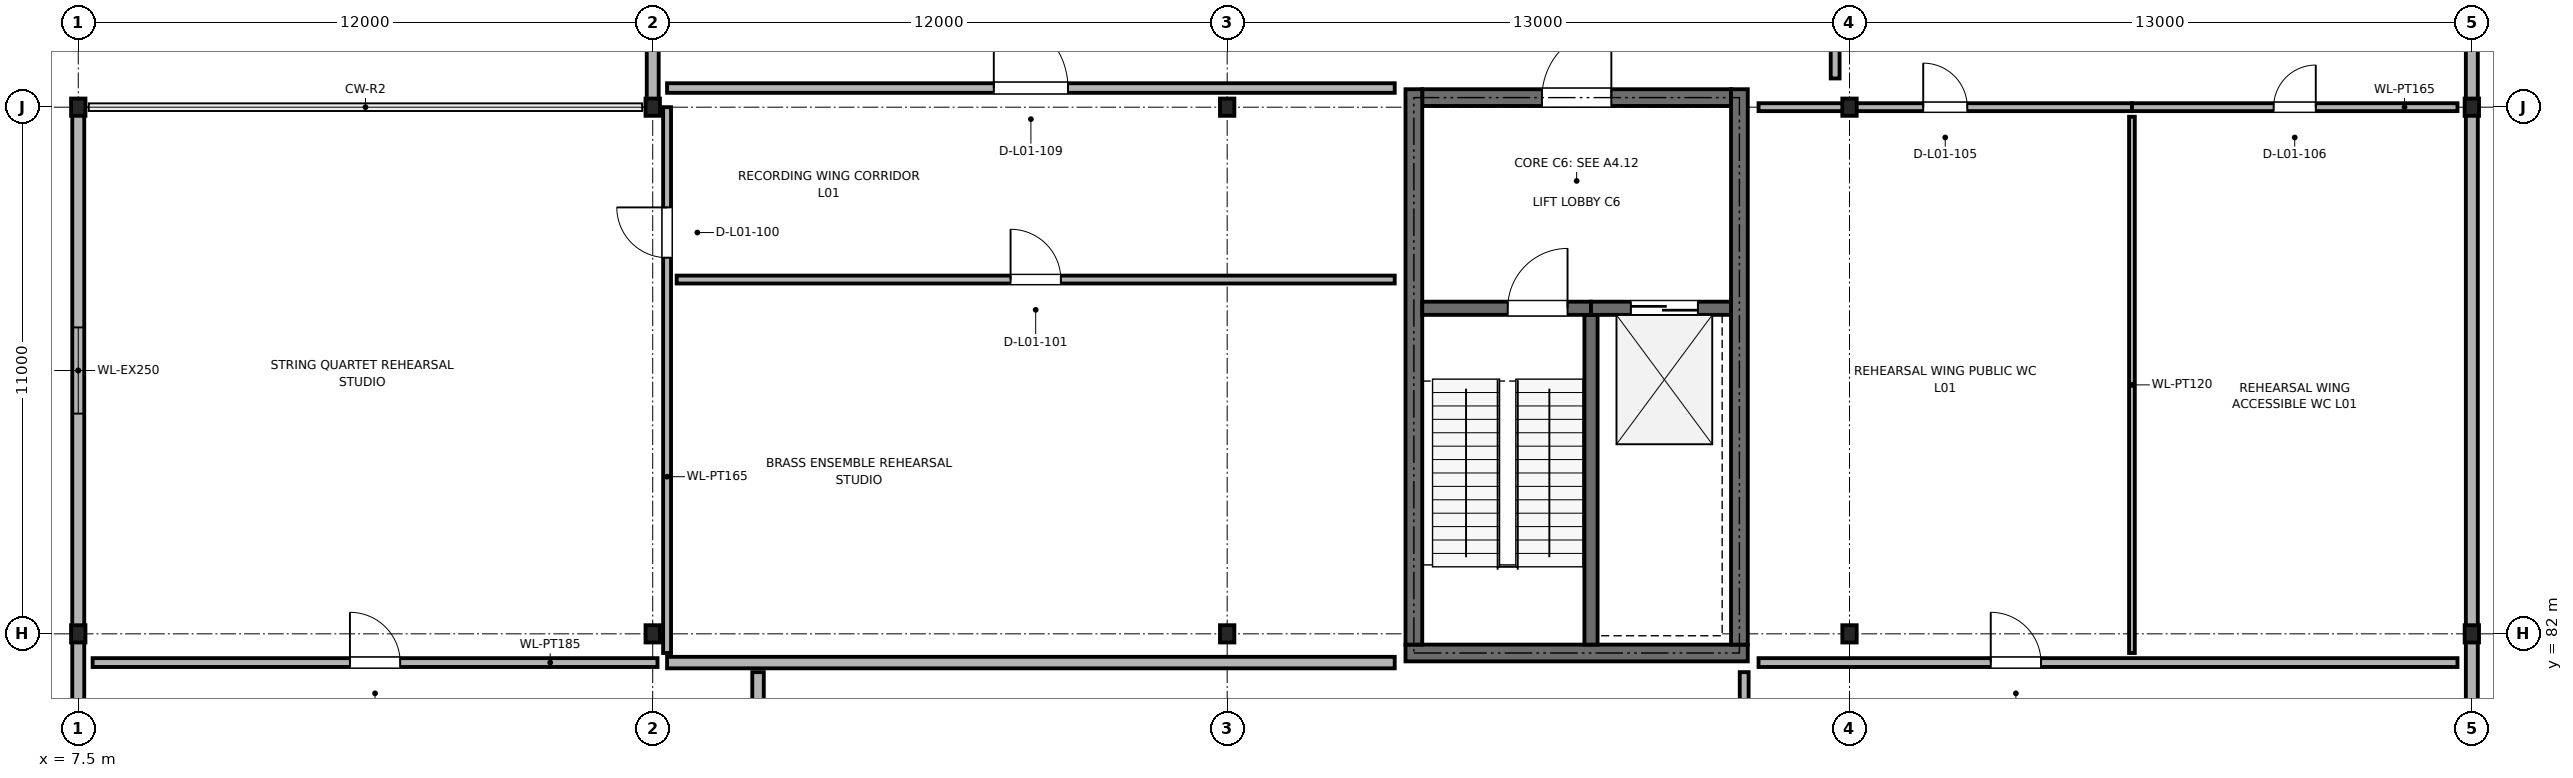
"""IFC4 building model, lengths in metres.
Left out: names, types, materials, properties, quantities, classifications, styles, units other than length and angle.
Written with IfcOpenShell. Run it as: python <this file> out.ifc"""

import sys

from ifc_helpers import new_model, si_unit, direction, frame, frame_2d, origin, origin_2d, place, context, subcontext, project, spatial, rectangle, i_section, extrude, element, fill, save


model = new_model("IFC4")
c1 = context("Model", 3, precision=1e-05, world=origin(), true_north=direction((0.0, 1.0)))
c2 = subcontext(c1, "Body", "Model", "MODEL_VIEW")
j1 = project(units=[si_unit("LENGTHUNIT", "METRE"), si_unit("PLANEANGLEUNIT", "RADIAN")], contexts=[c1])
p1 = place(None, origin())
s1 = spatial("IfcSite", under=j1, at=p1, CompositionType="ELEMENT")
p2 = place(p1, origin())
s2 = spatial("IfcBuilding", under=s1, at=p2, CompositionType="ELEMENT")
p3 = place(p2, frame((0.0, 0.0, 4.8)))
s3 = spatial("IfcBuildingStorey", under=s2, at=p3, CompositionType="ELEMENT", Elevation=4.8)
for number, where, z_axis, x_axis in (
    (1, (7.5, 82.0, 0.0), (0.0, 0.0, 1.0), (1.0, 0.0, 0.0)),
    (2, (7.5, 93.0, 0.0), (0.0, 0.0, 1.0), (1.0, 0.0, 0.0)),
    (3, (19.5, 82.0, 0.0), (0.0, 0.0, 1.0), (1.0, 0.0, 0.0)),
    (4, (19.5, 93.0, 0.0), (0.0, 0.0, 1.0), (1.0, 0.0, 0.0)),
    (5, (31.5, 82.0, 0.0), (0.0, 0.0, 1.0), (1.0, 0.0, 0.0)),
    (6, (31.5, 93.0, 0.0), (0.0, 0.0, 1.0), (1.0, 0.0, 0.0)),
    (7, (44.5, 82.0, 0.0), (0.0, 0.0, 1.0), (1.0, 0.0, 0.0)),
    (8, (44.5, 93.0, 0.0), (0.0, 0.0, 1.0), (1.0, 0.0, 0.0)),
    (9, (57.5, 82.0, 0.0), (0.0, 0.0, 1.0), (1.0, 0.0, 0.0)),
    (10, (57.5, 93.0, 0.0), (0.0, 0.0, 1.0), (1.0, 0.0, 0.0)),
):
    element("IfcColumn", number, at=place(p3, frame(where, z_axis=z_axis, x_axis=x_axis)), inside=s3, PredefinedType="COLUMN", context=c2, shape_type="SweptSolid", body=[
        extrude(i_section(OverallWidth=0.3, OverallDepth=0.36, WebThickness=0.012, FlangeThickness=0.022, FilletRadius=0.027, at=origin_2d()), origin(), (0.0, 0.0, 1.0), 4.8),
    ])
p4 = place(p3, frame((57.5, 81.98, 0.0), z_axis=(0.0, 0.0, 1.0), x_axis=(0.0, -1.0, 0.0)))
e11 = element("IfcWall", 11, at=p4, inside=s3, PredefinedType="SOLIDWALL", context=c2, shape_type="SweptSolid", body=[
    extrude(rectangle(XDim=10.96, YDim=0.25, at=frame_2d((5.48, 0.0))), origin(), (0.0, 0.0, 1.0), 4.078),
])
p5 = place(p4, frame((4.68, 0.0, 0.85)))
e12 = element("IfcOpeningElement", 12, at=p5, cuts=e11, PredefinedType="OPENING", context=c2, shape_type="SweptSolid", body=[
    extrude(rectangle(XDim=1.6, YDim=1.7, at=frame_2d((0.8, 0.85))), frame((0.0, 0.135, 0.0), z_axis=(0.0, -1.0, 0.0), x_axis=(1.0, 0.0, 0.0)), (0.0, 0.0, 1.0), 0.27),
])
p6 = place(p3, frame((57.5, 92.98, 0.0), z_axis=(0.0, 0.0, 1.0), x_axis=(0.0, -1.0, 0.0)))
e13 = element("IfcWall", 13, at=p6, inside=s3, PredefinedType="SOLIDWALL", context=c2, shape_type="SweptSolid", body=[
    extrude(rectangle(XDim=10.96, YDim=0.25, at=frame_2d((5.48, 0.0))), origin(), (0.0, 0.0, 1.0), 4.078),
])
p7 = place(p3, frame((57.5, 103.98, 0.0), z_axis=(0.0, 0.0, 1.0), x_axis=(0.0, -1.0, 0.0)))
e14 = element("IfcWall", 14, at=p7, inside=s3, PredefinedType="SOLIDWALL", context=c2, shape_type="SweptSolid", body=[
    extrude(rectangle(XDim=10.96, YDim=0.25, at=frame_2d((5.48, 0.0))), origin(), (0.0, 0.0, 1.0), 4.078),
])
p8 = place(p7, frame((4.58, 0.0, 0.85)))
e15 = element("IfcOpeningElement", 15, at=p8, cuts=e14, PredefinedType="OPENING", context=c2, shape_type="SweptSolid", body=[
    extrude(rectangle(XDim=1.8, YDim=1.7, at=frame_2d((0.9, 0.85))), frame((0.0, 0.135, 0.0), z_axis=(0.0, -1.0, 0.0), x_axis=(1.0, 0.0, 0.0)), (0.0, 0.0, 1.0), 0.27),
])
p9 = place(p3, frame((19.5, 93.02, 0.0), z_axis=(0.0, 0.0, 1.0), x_axis=(0.0, 1.0, 0.0)))
e16 = element("IfcWall", 16, at=p9, inside=s3, PredefinedType="SOLIDWALL", context=c2, shape_type="SweptSolid", body=[
    extrude(rectangle(XDim=10.96, YDim=0.25, at=frame_2d((5.48, 0.0))), origin(), (0.0, 0.0, 1.0), 4.078),
])
p10 = place(p9, frame((4.73, 0.0, 1.05)))
e17 = element("IfcOpeningElement", 17, at=p10, cuts=e16, PredefinedType="OPENING", context=c2, shape_type="SweptSolid", body=[
    extrude(rectangle(XDim=1.5, YDim=1.35, at=frame_2d((0.75, 0.675))), frame((0.0, 0.135, 0.0), z_axis=(0.0, -1.0, 0.0), x_axis=(1.0, 0.0, 0.0)), (0.0, 0.0, 1.0), 0.27),
])
p11 = place(p3, frame((7.5, 82.02, 0.0), z_axis=(0.0, 0.0, 1.0), x_axis=(0.0, 1.0, 0.0)))
e18 = element("IfcWall", 18, at=p11, inside=s3, PredefinedType="SOLIDWALL", context=c2, shape_type="SweptSolid", body=[
    extrude(rectangle(XDim=10.96, YDim=0.25, at=frame_2d((5.48, 0.0))), origin(), (0.0, 0.0, 1.0), 4.078),
])
p12 = place(p11, frame((4.58, 0.0, 1.05)))
e19 = element("IfcOpeningElement", 19, at=p12, cuts=e18, PredefinedType="OPENING", context=c2, shape_type="SweptSolid", body=[
    extrude(rectangle(XDim=1.8, YDim=1.35, at=frame_2d((0.9, 0.675))), frame((0.0, 0.135, 0.0), z_axis=(0.0, -1.0, 0.0), x_axis=(1.0, 0.0, 0.0)), (0.0, 0.0, 1.0), 0.27),
])
p13 = place(p3, frame((7.5, 71.02, 0.0), z_axis=(0.0, 0.0, 1.0), x_axis=(0.0, 1.0, 0.0)))
e20 = element("IfcWall", 20, at=p13, inside=s3, PredefinedType="SOLIDWALL", context=c2, shape_type="SweptSolid", body=[
    extrude(rectangle(XDim=10.96, YDim=0.25, at=frame_2d((5.48, 0.0))), origin(), (0.0, 0.0, 1.0), 4.078),
])
p14 = place(p13, frame((4.43, 0.0, 1.05)))
e21 = element("IfcOpeningElement", 21, at=p14, cuts=e20, PredefinedType="OPENING", context=c2, shape_type="SweptSolid", body=[
    extrude(rectangle(XDim=2.1, YDim=1.35, at=frame_2d((1.05, 0.675))), frame((0.0, 0.135, 0.0), z_axis=(0.0, -1.0, 0.0), x_axis=(1.0, 0.0, 0.0)), (0.0, 0.0, 1.0), 0.27),
])
p15 = place(p3, frame((35.225, 81.6, 0.0), z_axis=(0.0, 0.0, 1.0), x_axis=(1.0, 0.0, 0.0)))
e22 = element("IfcWall", 22, at=p15, inside=s3, PredefinedType="SHEAR", context=c2, shape_type="SweptSolid", body=[
    extrude(rectangle(XDim=7.15, YDim=0.35, at=frame_2d((3.575, 0.0))), origin(), (0.0, 0.0, 1.0), 4.54),
])
p16 = place(p3, frame((35.575, 93.2, 0.0), z_axis=(0.0, 0.0, 1.0), x_axis=(1.0, 0.0, 0.0)))
e23 = element("IfcWall", 23, at=p16, inside=s3, PredefinedType="SHEAR", context=c2, shape_type="SweptSolid", body=[
    extrude(rectangle(XDim=6.45, YDim=0.35, at=frame_2d((3.225, 0.0))), origin(), (0.0, 0.0, 1.0), 4.54),
])
p17 = place(p16, frame((2.5, 0.0, 0.0)))
e24 = element("IfcOpeningElement", 24, at=p17, cuts=e23, PredefinedType="OPENING", context=c2, shape_type="SweptSolid", body=[
    extrude(rectangle(XDim=1.45, YDim=2.2, at=frame_2d((0.725, 1.1))), frame((0.0, 0.185, 0.0), z_axis=(0.0, -1.0, 0.0), x_axis=(1.0, 0.0, 0.0)), (0.0, 0.0, 1.0), 0.37),
])
for number, where, z_axis, x_axis in (
    (25, (35.4, 81.775, 0.0), (0.0, 0.0, 1.0), (0.0, 1.0, 0.0)),
    (26, (42.2, 81.775, 0.0), (0.0, 0.0, 1.0), (0.0, 1.0, 0.0)),
):
    element("IfcWall", number, at=place(p3, frame(where, z_axis=z_axis, x_axis=x_axis)), inside=s3, PredefinedType="SHEAR", context=c2, shape_type="SweptSolid", body=[
        extrude(rectangle(XDim=11.6, YDim=0.35, at=frame_2d((5.8, 0.0))), origin(), (0.0, 0.0, 1.0), 4.54),
    ])
p18 = place(p3, frame((39.1, 81.775, 0.0), z_axis=(0.0, 0.0, 1.0), x_axis=(0.0, 1.0, 0.0)))
e27 = element("IfcWall", 27, at=p18, inside=s3, PredefinedType="SHEAR", context=c2, shape_type="SweptSolid", body=[
    extrude(rectangle(XDim=6.888, YDim=0.275, at=frame_2d((3.444, 0.0))), origin(), (0.0, 0.0, 1.0), 4.54),
])
p19 = place(p3, frame((35.575, 88.8, 0.0), z_axis=(0.0, 0.0, 1.0), x_axis=(1.0, 0.0, 0.0)))
e28 = element("IfcWall", 28, at=p19, inside=s3, PredefinedType="SHEAR", context=c2, shape_type="SweptSolid", body=[
    extrude(rectangle(XDim=3.525, YDim=0.275, at=frame_2d((1.763, 0.0))), origin(), (0.0, 0.0, 1.0), 4.54),
])
p20 = place(p19, frame((1.785, 0.0, 0.0)))
e29 = element("IfcOpeningElement", 29, at=p20, cuts=e28, PredefinedType="OPENING", context=c2, shape_type="SweptSolid", body=[
    extrude(rectangle(XDim=1.25, YDim=2.15, at=frame_2d((0.625, 1.075))), frame((0.0, 0.147, 0.0), z_axis=(0.0, -1.0, 0.0), x_axis=(1.0, 0.0, 0.0)), (0.0, 0.0, 1.0), 0.295),
])
p21 = place(p3, frame((39.1, 88.8, 0.0), z_axis=(0.0, 0.0, 1.0), x_axis=(1.0, 0.0, 0.0)))
e30 = element("IfcWall", 30, at=p21, inside=s3, PredefinedType="SHEAR", context=c2, shape_type="SweptSolid", body=[
    extrude(rectangle(XDim=2.925, YDim=0.275, at=frame_2d((1.462, 0.0))), origin(), (0.0, 0.0, 1.0), 4.54),
])
p22 = place(p21, frame((0.833, 0.0, 0.0)))
e31 = element("IfcOpeningElement", 31, at=p22, cuts=e30, PredefinedType="OPENING", context=c2, shape_type="SweptSolid", body=[
    extrude(rectangle(XDim=1.4, YDim=2.2, at=frame_2d((0.7, 1.1))), frame((0.0, 0.147, 0.0), z_axis=(0.0, -1.0, 0.0), x_axis=(1.0, 0.0, 0.0)), (0.0, 0.0, 1.0), 0.295),
])
p23 = place(p3, frame((19.8, 81.4, 0.0), z_axis=(0.0, 0.0, 1.0), x_axis=(1.0, 0.0, 0.0)))
e32 = element("IfcWall", 32, at=p23, inside=s3, PredefinedType="PARTITIONING", context=c2, shape_type="SweptSolid", body=[
    extrude(rectangle(XDim=15.2, YDim=0.24, at=frame_2d((7.6, 0.0))), origin(), (0.0, 0.0, 1.0), 3.88),
])
p24 = place(p3, frame((7.8, 81.4, 0.0), z_axis=(0.0, 0.0, 1.0), x_axis=(1.0, 0.0, 0.0)))
e33 = element("IfcWall", 33, at=p24, inside=s3, PredefinedType="PARTITIONING", context=c2, shape_type="SweptSolid", body=[
    extrude(rectangle(XDim=11.8, YDim=0.185, at=frame_2d((5.9, 0.0))), origin(), (0.0, 0.0, 1.0), 4.08),
])
p25 = place(p24, frame((5.375, 0.0, 0.0)))
e34 = element("IfcOpeningElement", 34, at=p25, cuts=e33, PredefinedType="OPENING", context=c2, shape_type="SweptSolid", body=[
    extrude(rectangle(XDim=1.05, YDim=2.15, at=frame_2d((0.525, 1.075))), frame((0.0, 0.103, 0.0), z_axis=(0.0, -1.0, 0.0), x_axis=(1.0, 0.0, 0.0)), (0.0, 0.0, 1.0), 0.205),
])
p26 = place(p3, frame((19.8, 81.6, 0.0), z_axis=(0.0, 0.0, 1.0), x_axis=(0.0, 1.0, 0.0)))
e35 = element("IfcWall", 35, at=p26, inside=s3, PredefinedType="PARTITIONING", context=c2, shape_type="SweptSolid", body=[
    extrude(rectangle(XDim=11.4, YDim=0.165, at=frame_2d((5.7, 0.0))), origin(), (0.0, 0.0, 1.0), 4.08),
])
p27 = place(p26, frame((8.257, 0.0, 0.0)))
e36 = element("IfcOpeningElement", 36, at=p27, cuts=e35, PredefinedType="OPENING", context=c2, shape_type="SweptSolid", body=[
    extrude(rectangle(XDim=1.05, YDim=2.15, at=frame_2d((0.525, 1.075))), frame((0.0, 0.093, 0.0), z_axis=(0.0, -1.0, 0.0), x_axis=(1.0, 0.0, 0.0)), (0.0, 0.0, 1.0), 0.185),
])
p28 = place(p3, frame((20.0, 89.4, 0.0), z_axis=(0.0, 0.0, 1.0), x_axis=(1.0, 0.0, 0.0)))
e37 = element("IfcWall", 37, at=p28, inside=s3, PredefinedType="PARTITIONING", context=c2, shape_type="SweptSolid", body=[
    extrude(rectangle(XDim=15.0, YDim=0.165, at=frame_2d((7.5, 0.0))), origin(), (0.0, 0.0, 1.0), 4.08),
])
p29 = place(p28, frame((6.975, 0.0, 0.0)))
e38 = element("IfcOpeningElement", 38, at=p29, cuts=e37, PredefinedType="OPENING", context=c2, shape_type="SweptSolid", body=[
    extrude(rectangle(XDim=1.05, YDim=2.15, at=frame_2d((0.525, 1.075))), frame((0.0, 0.093, 0.0), z_axis=(0.0, -1.0, 0.0), x_axis=(1.0, 0.0, 0.0)), (0.0, 0.0, 1.0), 0.185),
])
p30 = place(p3, frame((21.7, 60.3, 0.0), z_axis=(0.0, 0.0, 1.0), x_axis=(0.0, 1.0, 0.0)))
e39 = element("IfcWall", 39, at=p30, inside=s3, PredefinedType="PARTITIONING", context=c2, shape_type="SweptSolid", body=[
    extrude(rectangle(XDim=20.9, YDim=0.24, at=frame_2d((10.45, 0.0))), origin(), (0.0, 0.0, 1.0), 3.73),
])
p31 = place(p3, frame((42.3, 70.7, 0.0), z_axis=(0.0, 0.0, 1.0), x_axis=(0.0, 1.0, 0.0)))
e40 = element("IfcWall", 40, at=p31, inside=s3, PredefinedType="PARTITIONING", context=c2, shape_type="SweptSolid", body=[
    extrude(rectangle(XDim=10.5, YDim=0.185, at=frame_2d((5.25, 0.0))), origin(), (0.0, 0.0, 1.0), 3.73),
])
p32 = place(p3, frame((42.6, 93.0, 0.0), z_axis=(0.0, 0.0, 1.0), x_axis=(1.0, 0.0, 0.0)))
e41 = element("IfcWall", 41, at=p32, inside=s3, PredefinedType="PARTITIONING", context=c2, shape_type="SweptSolid", body=[
    extrude(rectangle(XDim=7.8, YDim=0.165, at=frame_2d((3.9, 0.0))), origin(), (0.0, 0.0, 1.0), 4.08),
])
p33 = place(p32, frame((3.44, 0.0, 0.0)))
e42 = element("IfcOpeningElement", 42, at=p33, cuts=e41, PredefinedType="OPENING", context=c2, shape_type="SweptSolid", body=[
    extrude(rectangle(XDim=0.92, YDim=2.1, at=frame_2d((0.46, 1.05))), frame((0.0, 0.093, 0.0), z_axis=(0.0, -1.0, 0.0), x_axis=(1.0, 0.0, 0.0)), (0.0, 0.0, 1.0), 0.185),
])
p34 = place(p3, frame((50.4, 93.0, 0.0), z_axis=(0.0, 0.0, 1.0), x_axis=(1.0, 0.0, 0.0)))
e43 = element("IfcWall", 43, at=p34, inside=s3, PredefinedType="PARTITIONING", context=c2, shape_type="SweptSolid", body=[
    extrude(rectangle(XDim=6.8, YDim=0.165, at=frame_2d((3.4, 0.0))), origin(), (0.0, 0.0, 1.0), 4.08),
])
p35 = place(p34, frame((2.96, 0.0, 0.0)))
e44 = element("IfcOpeningElement", 44, at=p35, cuts=e43, PredefinedType="OPENING", context=c2, shape_type="SweptSolid", body=[
    extrude(rectangle(XDim=0.88, YDim=2.1, at=frame_2d((0.44, 1.05))), frame((0.0, 0.093, 0.0), z_axis=(0.0, -1.0, 0.0), x_axis=(1.0, 0.0, 0.0)), (0.0, 0.0, 1.0), 0.185),
])
p36 = place(p3, frame((50.4, 81.6, 0.0), z_axis=(0.0, 0.0, 1.0), x_axis=(0.0, 1.0, 0.0)))
e45 = element("IfcWall", 45, at=p36, inside=s3, PredefinedType="PARTITIONING", context=c2, shape_type="SweptSolid", body=[
    extrude(rectangle(XDim=11.2, YDim=0.12, at=frame_2d((5.6, 0.0))), origin(), (0.0, 0.0, 1.0), 4.08),
])
p37 = place(p3, frame((42.6, 81.4, 0.0), z_axis=(0.0, 0.0, 1.0), x_axis=(1.0, 0.0, 0.0)))
e46 = element("IfcWall", 46, at=p37, inside=s3, PredefinedType="PARTITIONING", context=c2, shape_type="SweptSolid", body=[
    extrude(rectangle(XDim=14.6, YDim=0.185, at=frame_2d((7.3, 0.0))), origin(), (0.0, 0.0, 1.0), 4.08),
])
p38 = place(p37, frame((4.851, 0.0, 0.0)))
e47 = element("IfcOpeningElement", 47, at=p38, cuts=e46, PredefinedType="OPENING", context=c2, shape_type="SweptSolid", body=[
    extrude(rectangle(XDim=1.05, YDim=2.15, at=frame_2d((0.525, 1.075))), frame((0.0, 0.103, 0.0), z_axis=(0.0, -1.0, 0.0), x_axis=(1.0, 0.0, 0.0)), (0.0, 0.0, 1.0), 0.205),
])
p39 = place(p3, frame((44.2, 93.6, 0.0), z_axis=(0.0, 0.0, 1.0), x_axis=(0.0, 1.0, 0.0)))
e48 = element("IfcWall", 48, at=p39, inside=s3, PredefinedType="PARTITIONING", context=c2, shape_type="SweptSolid", body=[
    extrude(rectangle(XDim=21.3, YDim=0.185, at=frame_2d((10.65, 0.0))), origin(), (0.0, 0.0, 1.0), 4.08),
])
p40 = place(p39, frame((5.23, 0.0, 0.0)))
e49 = element("IfcOpeningElement", 49, at=p40, cuts=e48, PredefinedType="OPENING", context=c2, shape_type="SweptSolid", body=[
    extrude(rectangle(XDim=1.1, YDim=2.15, at=frame_2d((0.55, 1.075))), frame((0.0, 0.103, 0.0), z_axis=(0.0, -1.0, 0.0), x_axis=(1.0, 0.0, 0.0)), (0.0, 0.0, 1.0), 0.205),
])
p41 = place(p3, frame((19.8, 93.4, 0.0), z_axis=(0.0, 0.0, 1.0), x_axis=(1.0, 0.0, 0.0)))
e50 = element("IfcWall", 50, at=p41, inside=s3, PredefinedType="PARTITIONING", context=c2, shape_type="SweptSolid", body=[
    extrude(rectangle(XDim=15.2, YDim=0.2, at=frame_2d((7.6, 0.0))), origin(), (0.0, 0.0, 1.0), 4.08),
])
p42 = place(p41, frame((6.825, 0.0, 0.0)))
e51 = element("IfcOpeningElement", 51, at=p42, cuts=e50, PredefinedType="OPENING", context=c2, shape_type="SweptSolid", body=[
    extrude(rectangle(XDim=1.55, YDim=2.18, at=frame_2d((0.775, 1.09))), frame((0.0, 0.11, 0.0), z_axis=(0.0, -1.0, 0.0), x_axis=(1.0, 0.0, 0.0)), (0.0, 0.0, 1.0), 0.22),
])
p43 = place(p12, origin())
e52 = element("IfcWindow", 52, at=p43, inside=s3, PartitioningType="SINGLE_PANEL", PredefinedType="WINDOW", context=c2, shape_type="SweptSolid", body=[
    extrude(rectangle(XDim=1.8, YDim=1.35, at=frame_2d((0.9, 0.675))), frame((0.0, 0.03, 0.0), z_axis=(0.0, -1.0, 0.0), x_axis=(1.0, 0.0, 0.0)), (0.0, 0.0, 1.0), 0.06),
])
fill(e19, e52)
p44 = place(p20, origin())
e53 = element("IfcDoor", 53, at=p44, inside=s3, OperationType="SINGLE_SWING_RIGHT", PredefinedType="DOOR", context=c2, shape_type="SweptSolid", body=[
    extrude(rectangle(XDim=1.25, YDim=2.15, at=frame_2d((0.625, 1.075))), frame((0.0, 0.025, 0.0), z_axis=(0.0, -1.0, 0.0), x_axis=(1.0, 0.0, 0.0)), (0.0, 0.0, 1.0), 0.05),
])
fill(e29, e53)
p45 = place(p22, origin())
e54 = element("IfcDoor", 54, at=p45, inside=s3, OperationType="DOUBLE_DOOR_SLIDING", PredefinedType="DOOR", context=c2, shape_type="SweptSolid", body=[
    extrude(rectangle(XDim=1.4, YDim=2.2, at=frame_2d((0.7, 1.1))), frame((0.0, 0.025, 0.0), z_axis=(0.0, -1.0, 0.0), x_axis=(1.0, 0.0, 0.0)), (0.0, 0.0, 1.0), 0.05),
])
fill(e31, e54)
p46 = place(p17, origin())
e55 = element("IfcDoor", 55, at=p46, inside=s3, OperationType="SINGLE_SWING_RIGHT", PredefinedType="DOOR", context=c2, shape_type="SweptSolid", body=[
    extrude(rectangle(XDim=1.45, YDim=2.2, at=frame_2d((0.725, 1.1))), frame((0.0, 0.025, 0.0), z_axis=(0.0, -1.0, 0.0), x_axis=(1.0, 0.0, 0.0)), (0.0, 0.0, 1.0), 0.05),
])
fill(e24, e55)
p47 = place(p25, origin())
e56 = element("IfcDoor", 56, at=p47, inside=s3, OperationType="SINGLE_SWING_LEFT", PredefinedType="DOOR", context=c2, shape_type="SweptSolid", body=[
    extrude(rectangle(XDim=1.05, YDim=2.15, at=frame_2d((0.525, 1.075))), frame((0.0, 0.025, 0.0), z_axis=(0.0, -1.0, 0.0), x_axis=(1.0, 0.0, 0.0)), (0.0, 0.0, 1.0), 0.05),
])
fill(e34, e56)
p48 = place(p27, origin())
e57 = element("IfcDoor", 57, at=p48, inside=s3, OperationType="SINGLE_SWING_RIGHT", PredefinedType="DOOR", context=c2, shape_type="SweptSolid", body=[
    extrude(rectangle(XDim=1.05, YDim=2.15, at=frame_2d((0.525, 1.075))), frame((0.0, 0.025, 0.0), z_axis=(0.0, -1.0, 0.0), x_axis=(1.0, 0.0, 0.0)), (0.0, 0.0, 1.0), 0.05),
])
fill(e36, e57)
p49 = place(p29, origin())
e58 = element("IfcDoor", 58, at=p49, inside=s3, OperationType="SINGLE_SWING_LEFT", PredefinedType="DOOR", context=c2, shape_type="SweptSolid", body=[
    extrude(rectangle(XDim=1.05, YDim=2.15, at=frame_2d((0.525, 1.075))), frame((0.0, 0.025, 0.0), z_axis=(0.0, -1.0, 0.0), x_axis=(1.0, 0.0, 0.0)), (0.0, 0.0, 1.0), 0.05),
])
fill(e38, e58)
p50 = place(p33, origin())
e59 = element("IfcDoor", 59, at=p50, inside=s3, OperationType="SINGLE_SWING_LEFT", PredefinedType="DOOR", context=c2, shape_type="SweptSolid", body=[
    extrude(rectangle(XDim=0.92, YDim=2.1, at=frame_2d((0.46, 1.05))), frame((0.0, 0.025, 0.0), z_axis=(0.0, -1.0, 0.0), x_axis=(1.0, 0.0, 0.0)), (0.0, 0.0, 1.0), 0.05),
])
fill(e42, e59)
p51 = place(p35, origin())
e60 = element("IfcDoor", 60, at=p51, inside=s3, OperationType="SINGLE_SWING_RIGHT", PredefinedType="DOOR", context=c2, shape_type="SweptSolid", body=[
    extrude(rectangle(XDim=0.88, YDim=2.1, at=frame_2d((0.44, 1.05))), frame((0.0, 0.025, 0.0), z_axis=(0.0, -1.0, 0.0), x_axis=(1.0, 0.0, 0.0)), (0.0, 0.0, 1.0), 0.05),
])
fill(e44, e60)
p52 = place(p38, origin())
e61 = element("IfcDoor", 61, at=p52, inside=s3, OperationType="SINGLE_SWING_LEFT", PredefinedType="DOOR", context=c2, shape_type="SweptSolid", body=[
    extrude(rectangle(XDim=1.05, YDim=2.15, at=frame_2d((0.525, 1.075))), frame((0.0, 0.025, 0.0), z_axis=(0.0, -1.0, 0.0), x_axis=(1.0, 0.0, 0.0)), (0.0, 0.0, 1.0), 0.05),
])
fill(e47, e61)
p53 = place(p42, origin())
e62 = element("IfcDoor", 62, at=p53, inside=s3, OperationType="SINGLE_SWING_LEFT", PredefinedType="DOOR", context=c2, shape_type="SweptSolid", body=[
    extrude(rectangle(XDim=1.55, YDim=2.18, at=frame_2d((0.775, 1.09))), frame((0.0, 0.025, 0.0), z_axis=(0.0, -1.0, 0.0), x_axis=(1.0, 0.0, 0.0)), (0.0, 0.0, 1.0), 0.05),
])
fill(e51, e62)
save(model, sys.argv[1])
